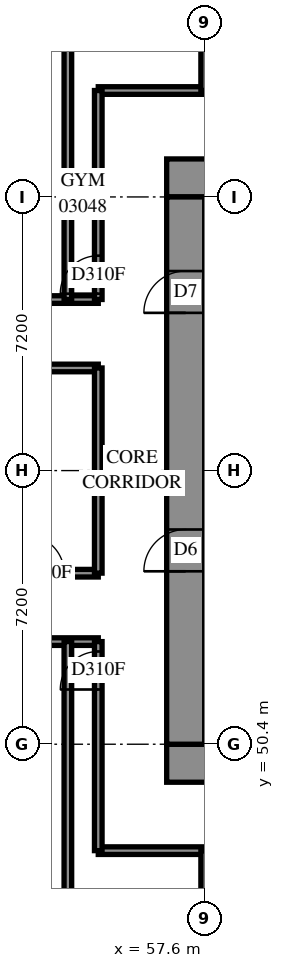
"""IFC4 building model, lengths in metres.
Left out: names, types, materials, properties, quantities, classifications, styles, units other than length and angle.
Written with IfcOpenShell. Run it as: python <this file> out.ifc"""

import sys

from ifc_helpers import new_model, si_unit, direction, frame, frame_2d, origin, place, context, subcontext, project, spatial, rectangle, extrude, element, fill, save


model = new_model("IFC4")
c1 = context("Model", 3, precision=1e-05, world=origin(), true_north=direction((0.0, 1.0)))
c2 = subcontext(c1, "Body", "Model", "MODEL_VIEW")
j1 = project(units=[si_unit("LENGTHUNIT", "METRE"), si_unit("PLANEANGLEUNIT", "RADIAN")], contexts=[c1])
p1 = place(None, origin())
s1 = spatial("IfcSite", under=j1, at=p1, CompositionType="ELEMENT")
p2 = place(p1, origin())
s2 = spatial("IfcBuilding", under=s1, at=p2, CompositionType="ELEMENT")
p3 = place(p2, frame((0.0, 0.0, 14.4)))
s3 = spatial("IfcBuildingStorey", under=s2, at=p3, CompositionType="ELEMENT", Elevation=14.4)
p4 = place(p3, frame((56.6, 49.9, -0.4), z_axis=(0.0, 0.0, 1.0), x_axis=(1.0, 0.0, 0.0)))
e1 = element("IfcWall", 1, at=p4, inside=s3, PredefinedType="SHEAR", context=c2, shape_type="SweptSolid", body=[
    extrude(rectangle(XDim=16.4, YDim=1.0, at=frame_2d((8.2, 0.0))), origin(), (0.0, 0.0, 1.0), 3.5),
])
p5 = place(p3, frame((56.6, 65.3, -0.4), z_axis=(0.0, 0.0, 1.0), x_axis=(1.0, 0.0, 0.0)))
e2 = element("IfcWall", 2, at=p5, inside=s3, PredefinedType="SHEAR", context=c2, shape_type="SweptSolid", body=[
    extrude(rectangle(XDim=16.4, YDim=1.0, at=frame_2d((8.2, 0.0))), origin(), (0.0, 0.0, 1.0), 3.5),
])
p6 = place(p5, frame((11.0, 0.0, 0.4)))
e3 = element("IfcOpeningElement", 3, at=p6, cuts=e2, PredefinedType="OPENING", context=c2, shape_type="SweptSolid", body=[
    extrude(rectangle(XDim=0.8, YDim=2.1, at=frame_2d((0.4, 1.05))), frame((0.0, 0.51, 0.0), z_axis=(0.0, -1.0, 0.0), x_axis=(1.0, 0.0, 0.0)), (0.0, 0.0, 1.0), 1.02),
])
p7 = place(p3, frame((57.1, 50.4, -0.4), z_axis=(0.0, 0.0, 1.0), x_axis=(0.0, 1.0, 0.0)))
e4 = element("IfcWall", 4, at=p7, inside=s3, PredefinedType="SHEAR", context=c2, shape_type="SweptSolid", body=[
    extrude(rectangle(XDim=14.4, YDim=1.0, at=frame_2d((7.2, 0.0))), origin(), (0.0, 0.0, 1.0), 3.5),
])
p8 = place(p7, frame((4.55, 0.0, 0.4)))
e5 = element("IfcOpeningElement", 5, at=p8, cuts=e4, PredefinedType="OPENING", context=c2, shape_type="SweptSolid", body=[
    extrude(rectangle(XDim=1.1, YDim=2.1, at=frame_2d((0.55, 1.05))), frame((0.0, 0.51, 0.0), z_axis=(0.0, -1.0, 0.0), x_axis=(1.0, 0.0, 0.0)), (0.0, 0.0, 1.0), 1.02),
])
p9 = place(p7, frame((11.35, 0.0, 0.4)))
e6 = element("IfcOpeningElement", 6, at=p9, cuts=e4, PredefinedType="OPENING", context=c2, shape_type="SweptSolid", body=[
    extrude(rectangle(XDim=1.1, YDim=2.1, at=frame_2d((0.55, 1.05))), frame((0.0, 0.51, 0.0), z_axis=(0.0, -1.0, 0.0), x_axis=(1.0, 0.0, 0.0)), (0.0, 0.0, 1.0), 1.02),
])
p10 = place(p3, frame((0.0, 54.9, 0.0), z_axis=(0.0, 0.0, 1.0), x_axis=(1.0, 0.0, 0.0)))
e7 = element("IfcWall", 7, at=p10, inside=s3, PredefinedType="PARTITIONING", context=c2, shape_type="SweptSolid", body=[
    extrude(rectangle(XDim=54.8, YDim=0.2, at=frame_2d((27.4, 0.0))), origin(), (0.0, 0.0, 1.0), 3.8),
])
p11 = place(p10, frame((10.485, 0.0, 0.0)))
e8 = element("IfcOpeningElement", 8, at=p11, cuts=e7, PredefinedType="OPENING", context=c2, shape_type="SweptSolid", body=[
    extrude(rectangle(XDim=1.0, YDim=2.1, at=frame_2d((0.5, 1.05))), frame((0.0, 0.11, 0.0), z_axis=(0.0, -1.0, 0.0), x_axis=(1.0, 0.0, 0.0)), (0.0, 0.0, 1.0), 0.22),
])
p12 = place(p10, frame((52.902, 0.0, 0.0)))
e9 = element("IfcOpeningElement", 9, at=p12, cuts=e7, PredefinedType="OPENING", context=c2, shape_type="SweptSolid", body=[
    extrude(rectangle(XDim=1.0, YDim=2.1, at=frame_2d((0.5, 1.05))), frame((0.0, 0.11, 0.0), z_axis=(0.0, -1.0, 0.0), x_axis=(1.0, 0.0, 0.0)), (0.0, 0.0, 1.0), 0.22),
])
p13 = place(p10, frame((2.268, 0.0, 0.0)))
e10 = element("IfcOpeningElement", 10, at=p13, cuts=e7, PredefinedType="OPENING", context=c2, shape_type="SweptSolid", body=[
    extrude(rectangle(XDim=1.0, YDim=2.1, at=frame_2d((0.5, 1.05))), frame((0.0, 0.11, 0.0), z_axis=(0.0, -1.0, 0.0), x_axis=(1.0, 0.0, 0.0)), (0.0, 0.0, 1.0), 0.22),
])
p14 = place(p3, frame((0.0, 53.1, 0.0), z_axis=(0.0, 0.0, 1.0), x_axis=(1.0, 0.0, 0.0)))
e11 = element("IfcWall", 11, at=p14, inside=s3, PredefinedType="PARTITIONING", context=c2, shape_type="SweptSolid", body=[
    extrude(rectangle(XDim=54.8, YDim=0.2, at=frame_2d((27.4, 0.0))), origin(), (0.0, 0.0, 1.0), 3.8),
])
p15 = place(p14, frame((8.669, 0.0, 0.0)))
e12 = element("IfcOpeningElement", 12, at=p15, cuts=e11, PredefinedType="OPENING", context=c2, shape_type="SweptSolid", body=[
    extrude(rectangle(XDim=1.0, YDim=2.1, at=frame_2d((0.5, 1.05))), frame((0.0, 0.11, 0.0), z_axis=(0.0, -1.0, 0.0), x_axis=(1.0, 0.0, 0.0)), (0.0, 0.0, 1.0), 0.22),
])
p16 = place(p14, frame((11.307, 0.0, 0.0)))
e13 = element("IfcOpeningElement", 13, at=p16, cuts=e11, PredefinedType="OPENING", context=c2, shape_type="SweptSolid", body=[
    extrude(rectangle(XDim=1.0, YDim=2.1, at=frame_2d((0.5, 1.05))), frame((0.0, 0.11, 0.0), z_axis=(0.0, -1.0, 0.0), x_axis=(1.0, 0.0, 0.0)), (0.0, 0.0, 1.0), 0.22),
])
p17 = place(p14, frame((20.058, 0.0, 0.0)))
e14 = element("IfcOpeningElement", 14, at=p17, cuts=e11, PredefinedType="OPENING", context=c2, shape_type="SweptSolid", body=[
    extrude(rectangle(XDim=1.0, YDim=2.1, at=frame_2d((0.5, 1.05))), frame((0.0, 0.11, 0.0), z_axis=(0.0, -1.0, 0.0), x_axis=(1.0, 0.0, 0.0)), (0.0, 0.0, 1.0), 0.22),
])
p18 = place(p14, frame((27.538, 0.0, 0.0)))
e15 = element("IfcOpeningElement", 15, at=p18, cuts=e11, PredefinedType="OPENING", context=c2, shape_type="SweptSolid", body=[
    extrude(rectangle(XDim=1.0, YDim=2.1, at=frame_2d((0.5, 1.05))), frame((0.0, 0.11, 0.0), z_axis=(0.0, -1.0, 0.0), x_axis=(1.0, 0.0, 0.0)), (0.0, 0.0, 1.0), 0.22),
])
p19 = place(p14, frame((36.542, 0.0, 0.0)))
e16 = element("IfcOpeningElement", 16, at=p19, cuts=e11, PredefinedType="OPENING", context=c2, shape_type="SweptSolid", body=[
    extrude(rectangle(XDim=1.0, YDim=2.1, at=frame_2d((0.5, 1.05))), frame((0.0, 0.11, 0.0), z_axis=(0.0, -1.0, 0.0), x_axis=(1.0, 0.0, 0.0)), (0.0, 0.0, 1.0), 0.22),
])
p20 = place(p14, frame((48.858, 0.0, 0.0)))
e17 = element("IfcOpeningElement", 17, at=p20, cuts=e11, PredefinedType="OPENING", context=c2, shape_type="SweptSolid", body=[
    extrude(rectangle(XDim=1.0, YDim=2.1, at=frame_2d((0.5, 1.05))), frame((0.0, 0.11, 0.0), z_axis=(0.0, -1.0, 0.0), x_axis=(1.0, 0.0, 0.0)), (0.0, 0.0, 1.0), 0.22),
])
p21 = place(p14, frame((2.522, 0.0, 0.0)))
e18 = element("IfcOpeningElement", 18, at=p21, cuts=e11, PredefinedType="OPENING", context=c2, shape_type="SweptSolid", body=[
    extrude(rectangle(XDim=1.0, YDim=2.1, at=frame_2d((0.5, 1.05))), frame((0.0, 0.11, 0.0), z_axis=(0.0, -1.0, 0.0), x_axis=(1.0, 0.0, 0.0)), (0.0, 0.0, 1.0), 0.22),
])
p22 = place(p14, frame((4.79, 0.0, 0.0)))
e19 = element("IfcOpeningElement", 19, at=p22, cuts=e11, PredefinedType="OPENING", context=c2, shape_type="SweptSolid", body=[
    extrude(rectangle(XDim=1.0, YDim=2.1, at=frame_2d((0.5, 1.05))), frame((0.0, 0.11, 0.0), z_axis=(0.0, -1.0, 0.0), x_axis=(1.0, 0.0, 0.0)), (0.0, 0.0, 1.0), 0.22),
])
p23 = place(p3, frame((0.002, 60.3, 0.0), z_axis=(0.0, 0.0, 1.0), x_axis=(1.0, 0.0, 0.0)))
e20 = element("IfcWall", 20, at=p23, inside=s3, PredefinedType="PARTITIONING", context=c2, shape_type="SweptSolid", body=[
    extrude(rectangle(XDim=54.798, YDim=0.2, at=frame_2d((27.399, 0.0))), origin(), (0.0, 0.0, 1.0), 3.8),
])
p24 = place(p23, frame((18.261, 0.0, 0.0)))
e21 = element("IfcOpeningElement", 21, at=p24, cuts=e20, PredefinedType="OPENING", context=c2, shape_type="SweptSolid", body=[
    extrude(rectangle(XDim=1.0, YDim=2.1, at=frame_2d((0.5, 1.05))), frame((0.0, 0.11, 0.0), z_axis=(0.0, -1.0, 0.0), x_axis=(1.0, 0.0, 0.0)), (0.0, 0.0, 1.0), 0.22),
])
p25 = place(p23, frame((27.256, 0.0, 0.0)))
e22 = element("IfcOpeningElement", 22, at=p25, cuts=e20, PredefinedType="OPENING", context=c2, shape_type="SweptSolid", body=[
    extrude(rectangle(XDim=1.0, YDim=2.1, at=frame_2d((0.5, 1.05))), frame((0.0, 0.11, 0.0), z_axis=(0.0, -1.0, 0.0), x_axis=(1.0, 0.0, 0.0)), (0.0, 0.0, 1.0), 0.22),
])
p26 = place(p23, frame((36.54, 0.0, 0.0)))
e23 = element("IfcOpeningElement", 23, at=p26, cuts=e20, PredefinedType="OPENING", context=c2, shape_type="SweptSolid", body=[
    extrude(rectangle(XDim=1.0, YDim=2.1, at=frame_2d((0.5, 1.05))), frame((0.0, 0.11, 0.0), z_axis=(0.0, -1.0, 0.0), x_axis=(1.0, 0.0, 0.0)), (0.0, 0.0, 1.0), 0.22),
])
p27 = place(p23, frame((47.06, 0.0, 0.0)))
e24 = element("IfcOpeningElement", 24, at=p27, cuts=e20, PredefinedType="OPENING", context=c2, shape_type="SweptSolid", body=[
    extrude(rectangle(XDim=1.0, YDim=2.1, at=frame_2d((0.5, 1.05))), frame((0.0, 0.11, 0.0), z_axis=(0.0, -1.0, 0.0), x_axis=(1.0, 0.0, 0.0)), (0.0, 0.0, 1.0), 0.22),
])
p28 = place(p23, frame((3.898, 0.0, 0.0)))
e25 = element("IfcOpeningElement", 25, at=p28, cuts=e20, PredefinedType="OPENING", context=c2, shape_type="SweptSolid", body=[
    extrude(rectangle(XDim=1.0, YDim=2.1, at=frame_2d((0.5, 1.05))), frame((0.0, 0.11, 0.0), z_axis=(0.0, -1.0, 0.0), x_axis=(1.0, 0.0, 0.0)), (0.0, 0.0, 1.0), 0.22),
])
p29 = place(p3, frame((0.002, 62.1, 0.0), z_axis=(0.0, 0.0, 1.0), x_axis=(1.0, 0.0, 0.0)))
e26 = element("IfcWall", 26, at=p29, inside=s3, PredefinedType="PARTITIONING", context=c2, shape_type="SweptSolid", body=[
    extrude(rectangle(XDim=54.798, YDim=0.2, at=frame_2d((27.399, 0.0))), origin(), (0.0, 0.0, 1.0), 3.8),
])
p30 = place(p29, frame((8.667, 0.0, 0.0)))
e27 = element("IfcOpeningElement", 27, at=p30, cuts=e26, PredefinedType="OPENING", context=c2, shape_type="SweptSolid", body=[
    extrude(rectangle(XDim=1.0, YDim=2.1, at=frame_2d((0.5, 1.05))), frame((0.0, 0.11, 0.0), z_axis=(0.0, -1.0, 0.0), x_axis=(1.0, 0.0, 0.0)), (0.0, 0.0, 1.0), 0.22),
])
p31 = place(p29, frame((13.136, 0.0, 0.0)))
e28 = element("IfcOpeningElement", 28, at=p31, cuts=e26, PredefinedType="OPENING", context=c2, shape_type="SweptSolid", body=[
    extrude(rectangle(XDim=1.0, YDim=2.1, at=frame_2d((0.5, 1.05))), frame((0.0, 0.11, 0.0), z_axis=(0.0, -1.0, 0.0), x_axis=(1.0, 0.0, 0.0)), (0.0, 0.0, 1.0), 0.22),
])
p32 = place(p29, frame((20.335, 0.0, 0.0)))
e29 = element("IfcOpeningElement", 29, at=p32, cuts=e26, PredefinedType="OPENING", context=c2, shape_type="SweptSolid", body=[
    extrude(rectangle(XDim=1.0, YDim=2.1, at=frame_2d((0.5, 1.05))), frame((0.0, 0.11, 0.0), z_axis=(0.0, -1.0, 0.0), x_axis=(1.0, 0.0, 0.0)), (0.0, 0.0, 1.0), 0.22),
])
p33 = place(p29, frame((27.535, 0.0, 0.0)))
e30 = element("IfcOpeningElement", 30, at=p33, cuts=e26, PredefinedType="OPENING", context=c2, shape_type="SweptSolid", body=[
    extrude(rectangle(XDim=1.0, YDim=2.1, at=frame_2d((0.5, 1.05))), frame((0.0, 0.11, 0.0), z_axis=(0.0, -1.0, 0.0), x_axis=(1.0, 0.0, 0.0)), (0.0, 0.0, 1.0), 0.22),
])
p34 = place(p29, frame((34.736, 0.0, 0.0)))
e31 = element("IfcOpeningElement", 31, at=p34, cuts=e26, PredefinedType="OPENING", context=c2, shape_type="SweptSolid", body=[
    extrude(rectangle(XDim=1.0, YDim=2.1, at=frame_2d((0.5, 1.05))), frame((0.0, 0.11, 0.0), z_axis=(0.0, -1.0, 0.0), x_axis=(1.0, 0.0, 0.0)), (0.0, 0.0, 1.0), 0.22),
])
p35 = place(p29, frame((41.935, 0.0, 0.0)))
e32 = element("IfcOpeningElement", 32, at=p35, cuts=e26, PredefinedType="OPENING", context=c2, shape_type="SweptSolid", body=[
    extrude(rectangle(XDim=1.0, YDim=2.1, at=frame_2d((0.5, 1.05))), frame((0.0, 0.11, 0.0), z_axis=(0.0, -1.0, 0.0), x_axis=(1.0, 0.0, 0.0)), (0.0, 0.0, 1.0), 0.22),
])
p36 = place(p29, frame((49.136, 0.0, 0.0)))
e33 = element("IfcOpeningElement", 33, at=p36, cuts=e26, PredefinedType="OPENING", context=c2, shape_type="SweptSolid", body=[
    extrude(rectangle(XDim=1.0, YDim=2.1, at=frame_2d((0.5, 1.05))), frame((0.0, 0.11, 0.0), z_axis=(0.0, -1.0, 0.0), x_axis=(1.0, 0.0, 0.0)), (0.0, 0.0, 1.0), 0.22),
])
p37 = place(p29, frame((4.799, 0.0, 0.0)))
e34 = element("IfcOpeningElement", 34, at=p37, cuts=e26, PredefinedType="OPENING", context=c2, shape_type="SweptSolid", body=[
    extrude(rectangle(XDim=1.0, YDim=2.1, at=frame_2d((0.5, 1.05))), frame((0.0, 0.11, 0.0), z_axis=(0.0, -1.0, 0.0), x_axis=(1.0, 0.0, 0.0)), (0.0, 0.0, 1.0), 0.22),
])
p38 = place(p3, frame((54.8, 67.6, 0.0), z_axis=(0.0, 0.0, 1.0), x_axis=(1.0, 0.0, 0.0)))
e35 = element("IfcWall", 35, at=p38, inside=s3, PredefinedType="PARTITIONING", context=c2, shape_type="SweptSolid", body=[
    extrude(rectangle(XDim=20.0, YDim=0.2, at=frame_2d((10.0, 0.0))), origin(), (0.0, 0.0, 1.0), 3.8),
])
p39 = place(p38, frame((6.662, 0.0, 0.0)))
e36 = element("IfcOpeningElement", 36, at=p39, cuts=e35, PredefinedType="OPENING", context=c2, shape_type="SweptSolid", body=[
    extrude(rectangle(XDim=1.0, YDim=2.1, at=frame_2d((0.5, 1.05))), frame((0.0, 0.11, 0.0), z_axis=(0.0, -1.0, 0.0), x_axis=(1.0, 0.0, 0.0)), (0.0, 0.0, 1.0), 0.22),
])
p40 = place(p38, frame((13.863, 0.0, 0.0)))
e37 = element("IfcOpeningElement", 37, at=p40, cuts=e35, PredefinedType="OPENING", context=c2, shape_type="SweptSolid", body=[
    extrude(rectangle(XDim=1.0, YDim=2.1, at=frame_2d((0.5, 1.05))), frame((0.0, 0.11, 0.0), z_axis=(0.0, -1.0, 0.0), x_axis=(1.0, 0.0, 0.0)), (0.0, 0.0, 1.0), 0.22),
])
p41 = place(p3, frame((54.8, 47.6, 0.0), z_axis=(0.0, 0.0, 1.0), x_axis=(1.0, 0.0, 0.0)))
e38 = element("IfcWall", 38, at=p41, inside=s3, PredefinedType="PARTITIONING", context=c2, shape_type="SweptSolid", body=[
    extrude(rectangle(XDim=19.384, YDim=0.2, at=frame_2d((9.692, 0.0))), origin(), (0.0, 0.0, 1.0), 3.8),
])
p42 = place(p41, frame((8.458, 0.0, 0.0)))
e39 = element("IfcOpeningElement", 39, at=p42, cuts=e38, PredefinedType="OPENING", context=c2, shape_type="SweptSolid", body=[
    extrude(rectangle(XDim=1.0, YDim=2.1, at=frame_2d((0.5, 1.05))), frame((0.0, 0.11, 0.0), z_axis=(0.0, -1.0, 0.0), x_axis=(1.0, 0.0, 0.0)), (0.0, 0.0, 1.0), 0.22),
])
p43 = place(p41, frame((14.107, 0.0, 0.0)))
e40 = element("IfcOpeningElement", 40, at=p43, cuts=e38, PredefinedType="OPENING", context=c2, shape_type="SweptSolid", body=[
    extrude(rectangle(XDim=1.0, YDim=2.1, at=frame_2d((0.5, 1.05))), frame((0.0, 0.11, 0.0), z_axis=(0.0, -1.0, 0.0), x_axis=(1.0, 0.0, 0.0)), (0.0, 0.0, 1.0), 0.22),
])
p44 = place(p3, frame((54.0, 42.0, 0.0), z_axis=(0.0, 0.0, 1.0), x_axis=(0.0, 1.0, 0.0)))
e41 = element("IfcWall", 41, at=p44, inside=s3, PredefinedType="PARTITIONING", context=c2, shape_type="SweptSolid", body=[
    extrude(rectangle(XDim=11.1, YDim=0.2, at=frame_2d((5.55, 0.0))), origin(), (0.0, 0.0, 1.0), 3.8),
])
p45 = place(p3, frame((54.0, 62.1, 0.0), z_axis=(0.0, 0.0, 1.0), x_axis=(0.0, 1.0, 0.0)))
e42 = element("IfcWall", 42, at=p45, inside=s3, PredefinedType="PARTITIONING", context=c2, shape_type="SweptSolid", body=[
    extrude(rectangle(XDim=10.55, YDim=0.2, at=frame_2d((5.275, 0.0))), origin(), (0.0, 0.0, 1.0), 3.8),
])
p46 = place(p3, frame((54.8, 47.6, 0.0), z_axis=(0.0, 0.0, 1.0), x_axis=(0.0, 1.0, 0.0)))
e43 = element("IfcWall", 43, at=p46, inside=s3, PredefinedType="PARTITIONING", context=c2, shape_type="SweptSolid", body=[
    extrude(rectangle(XDim=5.5, YDim=0.2, at=frame_2d((2.75, 0.0))), origin(), (0.0, 0.0, 1.0), 3.8),
])
p47 = place(p46, frame((4.24, 0.0, 0.0)))
e44 = element("IfcOpeningElement", 44, at=p47, cuts=e43, PredefinedType="OPENING", context=c2, shape_type="SweptSolid", body=[
    extrude(rectangle(XDim=1.0, YDim=2.1, at=frame_2d((0.5, 1.05))), frame((0.0, 0.11, 0.0), z_axis=(0.0, -1.0, 0.0), x_axis=(1.0, 0.0, 0.0)), (0.0, 0.0, 1.0), 0.22),
])
p48 = place(p3, frame((54.8, 62.102, 0.0), z_axis=(0.0, 0.0, 1.0), x_axis=(0.0, 1.0, 0.0)))
e45 = element("IfcWall", 45, at=p48, inside=s3, PredefinedType="PARTITIONING", context=c2, shape_type="SweptSolid", body=[
    extrude(rectangle(XDim=5.498, YDim=0.2, at=frame_2d((2.749, 0.0))), origin(), (0.0, 0.0, 1.0), 3.8),
])
p49 = place(p48, frame((0.152, 0.0, 0.0)))
e46 = element("IfcOpeningElement", 46, at=p49, cuts=e45, PredefinedType="OPENING", context=c2, shape_type="SweptSolid", body=[
    extrude(rectangle(XDim=1.0, YDim=2.1, at=frame_2d((0.5, 1.05))), frame((0.0, 0.11, 0.0), z_axis=(0.0, -1.0, 0.0), x_axis=(1.0, 0.0, 0.0)), (0.0, 0.0, 1.0), 0.22),
])
p50 = place(p3, frame((54.8, 54.902, 0.0), z_axis=(0.0, 0.0, 1.0), x_axis=(0.0, 1.0, 0.0)))
e47 = element("IfcWall", 47, at=p50, inside=s3, PredefinedType="PARTITIONING", context=c2, shape_type="SweptSolid", body=[
    extrude(rectangle(XDim=5.398, YDim=0.2, at=frame_2d((2.699, 0.0))), origin(), (0.0, 0.0, 1.0), 3.8),
])
for number, where, z_axis, x_axis in (
    (48, (57.6, 67.6, 0.0), (0.0, 0.0, 1.0), (0.0, 1.0, 0.0)),
    (49, (57.6, 43.8, 0.0), (0.0, 0.0, 1.0), (0.0, 1.0, 0.0)),
):
    element("IfcWall", number, at=place(p3, frame(where, z_axis=z_axis, x_axis=x_axis)), inside=s3, PredefinedType="PARTITIONING", context=c2, shape_type="SweptSolid", body=[
        extrude(rectangle(XDim=3.8, YDim=0.2, at=frame_2d((1.9, 0.0))), origin(), (0.0, 0.0, 1.0), 3.8),
    ])
p51 = place(p8, origin())
e50 = element("IfcDoor", 50, at=p51, inside=s3, OperationType="DOUBLE_DOOR_SINGLE_SWING", PredefinedType="DOOR", context=c2, shape_type="SweptSolid", body=[
    extrude(rectangle(XDim=1.1, YDim=2.1, at=frame_2d((0.55, 1.05))), frame((0.0, 0.025, 0.0), z_axis=(0.0, -1.0, 0.0), x_axis=(1.0, 0.0, 0.0)), (0.0, 0.0, 1.0), 0.05),
])
fill(e5, e50)
p52 = place(p9, origin())
e51 = element("IfcDoor", 51, at=p52, inside=s3, OperationType="SINGLE_SWING_LEFT", PredefinedType="DOOR", context=c2, shape_type="SweptSolid", body=[
    extrude(rectangle(XDim=1.1, YDim=2.1, at=frame_2d((0.55, 1.05))), frame((0.0, 0.025, 0.0), z_axis=(0.0, -1.0, 0.0), x_axis=(1.0, 0.0, 0.0)), (0.0, 0.0, 1.0), 0.05),
])
fill(e6, e51)
p53 = place(p47, origin())
e52 = element("IfcDoor", 52, at=p53, inside=s3, OperationType="SINGLE_SWING_RIGHT", PredefinedType="DOOR", context=c2, shape_type="SweptSolid", body=[
    extrude(rectangle(XDim=1.0, YDim=2.1, at=frame_2d((0.5, 1.05))), frame((0.0, 0.025, 0.0), z_axis=(0.0, -1.0, 0.0), x_axis=(1.0, 0.0, 0.0)), (0.0, 0.0, 1.0), 0.05),
])
fill(e44, e52)
p54 = place(p12, origin())
e53 = element("IfcDoor", 53, at=p54, inside=s3, OperationType="SINGLE_SWING_RIGHT", PredefinedType="DOOR", context=c2, shape_type="SweptSolid", body=[
    extrude(rectangle(XDim=1.0, YDim=2.1, at=frame_2d((0.5, 1.05))), frame((0.0, 0.025, 0.0), z_axis=(0.0, -1.0, 0.0), x_axis=(1.0, 0.0, 0.0)), (0.0, 0.0, 1.0), 0.05),
])
fill(e9, e53)
p55 = place(p49, origin())
e54 = element("IfcDoor", 54, at=p55, inside=s3, OperationType="SINGLE_SWING_LEFT", PredefinedType="DOOR", context=c2, shape_type="SweptSolid", body=[
    extrude(rectangle(XDim=1.0, YDim=2.1, at=frame_2d((0.5, 1.05))), frame((0.0, 0.025, 0.0), z_axis=(0.0, -1.0, 0.0), x_axis=(1.0, 0.0, 0.0)), (0.0, 0.0, 1.0), 0.05),
])
fill(e46, e54)
save(model, sys.argv[1])
